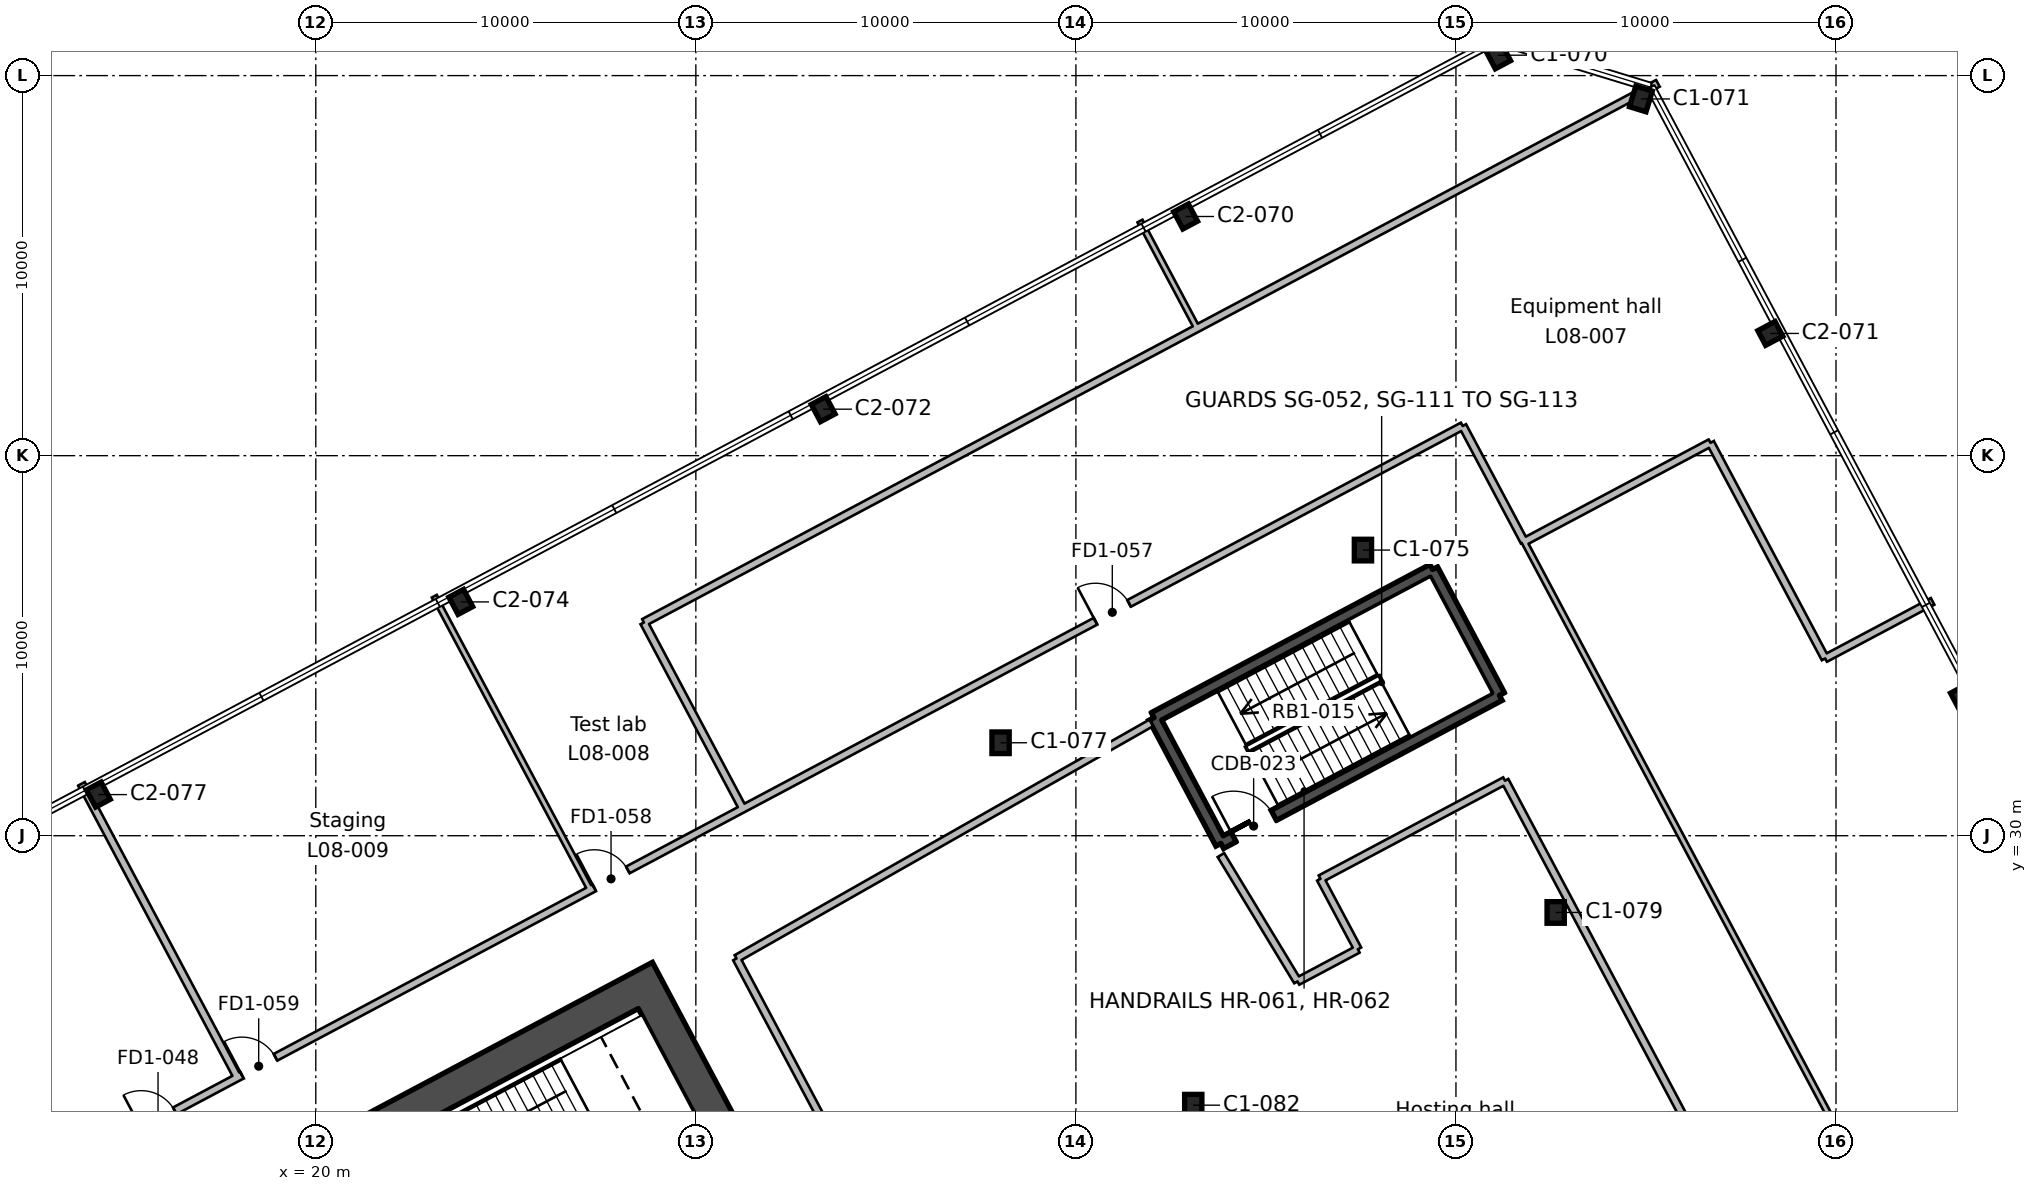
"""IFC4 building model, lengths in metres.
Left out: names, types, materials, properties, quantities, classifications, styles, units other than length and angle.
Written with IfcOpenShell. Run it as: python <this file> out.ifc"""

import sys

from ifc_helpers import new_model, si_unit, direction, frame, frame_2d, origin, origin_2d, place, context, subcontext, project, spatial, rectangle, i_section, extrude, element, fill, save


model = new_model("IFC4")
c1 = context("Model", 3, precision=1e-05, world=origin(), true_north=direction((0.0, 1.0)))
c2 = subcontext(c1, "Body", "Model", "MODEL_VIEW")
j1 = project(units=[si_unit("LENGTHUNIT", "METRE"), si_unit("PLANEANGLEUNIT", "RADIAN")], contexts=[c1])
p1 = place(None, origin())
s1 = spatial("IfcSite", under=j1, at=p1, CompositionType="ELEMENT")
p2 = place(p1, origin())
s2 = spatial("IfcBuilding", under=s1, at=p2, CompositionType="ELEMENT")
p3 = place(p2, frame((0.0, 0.0, 44.6)))
s3 = spatial("IfcBuildingStorey", under=s2, at=p3, CompositionType="ELEMENT", Elevation=44.6)
for number, where, z_axis, x_axis in (
    (1, (43.088, 22.91, 0.0), (0.0, 0.0, 1.0), (1.0, 0.0, 0.0)),
    (2, (52.624, 27.981, 0.0), (0.0, 0.0, 1.0), (1.0, 0.0, 0.0)),
):
    element("IfcColumn", number, at=place(p3, frame(where, z_axis=z_axis, x_axis=x_axis)), inside=s3, PredefinedType="COLUMN", context=c2, shape_type="SweptSolid", body=[
        extrude(i_section(OverallWidth=0.455, OverallDepth=0.569, WebThickness=0.078, FlangeThickness=0.125, FilletRadius=0.015, at=origin_2d()), origin(), (0.0, 0.0, 1.0), 5.4),
    ])
p4 = place(p3, frame((14.279, 31.082, 0.0), z_axis=(0.0, 0.0, 1.0), x_axis=(-0.882947592859, -0.469471562786, 0.0)))
e3 = element("IfcColumn", 3, at=p4, inside=s3, PredefinedType="COLUMN", context=c2, shape_type="SweptSolid", body=[
    extrude(i_section(OverallWidth=0.437, OverallDepth=0.513, WebThickness=0.061, FlangeThickness=0.097, FilletRadius=0.015, at=origin_2d()), origin(), (0.0, 0.0, 1.0), 5.4),
])
p5 = place(p3, frame((38.018, 32.446, 0.0), z_axis=(0.0, 0.0, 1.0), x_axis=(1.0, 0.0, 0.0)))
e4 = element("IfcColumn", 4, at=p5, inside=s3, PredefinedType="COLUMN", context=c2, shape_type="SweptSolid", body=[
    extrude(i_section(OverallWidth=0.455, OverallDepth=0.569, WebThickness=0.078, FlangeThickness=0.125, FilletRadius=0.015, at=origin_2d()), origin(), (0.0, 0.0, 1.0), 5.4),
])
for number, where, z_axis, x_axis in (
    (5, (63.343, 33.68, 0.0), (0.0, 0.0, 1.0), (-0.469, 0.883, 0.0)),
    (6, (23.815, 36.152, 0.0), (0.0, 0.0, 1.0), (-0.883, -0.469, 0.0)),
):
    element("IfcColumn", number, at=place(p3, frame(where, z_axis=z_axis, x_axis=x_axis)), inside=s3, PredefinedType="COLUMN", context=c2, shape_type="SweptSolid", body=[
        extrude(i_section(OverallWidth=0.437, OverallDepth=0.513, WebThickness=0.061, FlangeThickness=0.097, FilletRadius=0.015, at=origin_2d()), origin(), (0.0, 0.0, 1.0), 5.4),
    ])
p6 = place(p3, frame((47.553, 37.516, 0.0), z_axis=(0.0, 0.0, 1.0), x_axis=(1.0, 0.0, 0.0)))
e7 = element("IfcColumn", 7, at=p6, inside=s3, PredefinedType="COLUMN", context=c2, shape_type="SweptSolid", body=[
    extrude(i_section(OverallWidth=0.455, OverallDepth=0.569, WebThickness=0.078, FlangeThickness=0.125, FilletRadius=0.015, at=origin_2d()), origin(), (0.0, 0.0, 1.0), 5.4),
])
for number, where, z_axis, x_axis in (
    (8, (33.351, 41.223, 0.0), (0.0, 0.0, 1.0), (-0.883, -0.469, 0.0)),
    (9, (58.272, 43.216, 0.0), (0.0, 0.0, 1.0), (-0.469, 0.883, 0.0)),
    (10, (42.887, 46.293, 0.0), (0.0, 0.0, 1.0), (-0.883, -0.469, 0.0)),
):
    element("IfcColumn", number, at=place(p3, frame(where, z_axis=z_axis, x_axis=x_axis)), inside=s3, PredefinedType="COLUMN", context=c2, shape_type="SweptSolid", body=[
        extrude(i_section(OverallWidth=0.437, OverallDepth=0.513, WebThickness=0.061, FlangeThickness=0.097, FilletRadius=0.015, at=origin_2d()), origin(), (0.0, 0.0, 1.0), 5.4),
    ])
for number, where, z_axis, x_axis in (
    (11, (54.867, 49.386, 0.0), (0.0, 0.0, 1.0), (-0.956, 0.292, 0.0)),
    (12, (51.103, 50.537, 0.0), (0.0, 0.0, 1.0), (-0.883, -0.469, 0.0)),
):
    element("IfcColumn", number, at=place(p3, frame(where, z_axis=z_axis, x_axis=x_axis)), inside=s3, PredefinedType="COLUMN", context=c2, shape_type="SweptSolid", body=[
        extrude(i_section(OverallWidth=0.455, OverallDepth=0.569, WebThickness=0.078, FlangeThickness=0.125, FilletRadius=0.015, at=origin_2d()), origin(), (0.0, 0.0, 1.0), 5.4),
    ])
p7 = place(p3, frame((37.849, 8.799, 0.0), z_axis=(0.0, 0.0, 1.0), x_axis=(-0.469465789982, 0.882950662289, 0.0)))
e13 = element("IfcWall", 13, at=p7, inside=s3, PredefinedType="SHEAR", context=c2, shape_type="SweptSolid", body=[
    extrude(rectangle(XDim=20.0, YDim=0.9, at=frame_2d((10.0, 0.0))), origin(), (0.0, 0.0, 1.0), 5.4),
])
p8 = place(p7, frame((10.6, 0.0, 0.0)))
e14 = element("IfcOpeningElement", 14, at=p8, cuts=e13, PredefinedType="OPENING", context=c2, shape_type="SweptSolid", body=[
    extrude(rectangle(XDim=2.4, YDim=2.4, at=frame_2d((1.2, 1.2))), frame((0.0, 0.46, 0.0), z_axis=(0.0, -1.0, 0.0), x_axis=(1.0, 0.0, 0.0)), (0.0, 0.0, 1.0), 0.92),
])
p9 = place(p3, frame((10.438, 16.366, 0.0), z_axis=(0.0, 0.0, 1.0), x_axis=(0.88294509198, 0.469476266226, 0.0)))
e15 = element("IfcWall", 15, at=p9, inside=s3, PredefinedType="SHEAR", context=c2, shape_type="SweptSolid", body=[
    extrude(rectangle(XDim=20.2, YDim=0.9, at=frame_2d((10.1, 0.0))), origin(), (0.0, 0.0, 1.0), 5.4),
])
p10 = place(p3, frame((49.384, 37.004, 0.0), z_axis=(0.0, 0.0, 1.0), x_axis=(0.46946936446, -0.882948761726, 0.0)))
e16 = element("IfcWall", 16, at=p10, inside=s3, PredefinedType="SHEAR", context=c2, shape_type="SweptSolid", body=[
    extrude(rectangle(XDim=3.75, YDim=0.3, at=frame_2d((1.875, 0.0))), origin(), (0.0, 0.0, 1.0), 5.4),
])
p11 = place(p3, frame((51.145, 33.693, 0.0), z_axis=(0.0, 0.0, 1.0), x_axis=(-0.882945809314, -0.469474917132, 0.0)))
e17 = element("IfcWall", 17, at=p11, inside=s3, PredefinedType="SHEAR", context=c2, shape_type="SweptSolid", body=[
    extrude(rectangle(XDim=8.3, YDim=0.3, at=frame_2d((4.15, 0.0))), origin(), (0.0, 0.0, 1.0), 5.4),
])
p12 = place(p11, frame((6.725, 0.0, 0.0)))
e18 = element("IfcOpeningElement", 18, at=p12, cuts=e17, PredefinedType="OPENING", context=c2, shape_type="SweptSolid", body=[
    extrude(rectangle(XDim=1.2, YDim=2.1, at=frame_2d((0.6, 1.05))), frame((0.0, 0.16, 0.0), z_axis=(0.0, -1.0, 0.0), x_axis=(1.0, 0.0, 0.0)), (0.0, 0.0, 1.0), 0.32),
])
p13 = place(p3, frame((43.816, 29.796, 0.0), z_axis=(0.0, 0.0, 1.0), x_axis=(-0.46946936446, 0.882948761726, 0.0)))
e19 = element("IfcWall", 19, at=p13, inside=s3, PredefinedType="SHEAR", context=c2, shape_type="SweptSolid", body=[
    extrude(rectangle(XDim=3.75, YDim=0.3, at=frame_2d((1.875, 0.0))), origin(), (0.0, 0.0, 1.0), 5.4),
])
p14 = place(p3, frame((42.055, 33.107, 0.0), z_axis=(0.0, 0.0, 1.0), x_axis=(0.882945809314, 0.469474917132, 0.0)))
e20 = element("IfcWall", 20, at=p14, inside=s3, PredefinedType="SHEAR", context=c2, shape_type="SweptSolid", body=[
    extrude(rectangle(XDim=8.3, YDim=0.3, at=frame_2d((4.15, 0.0))), origin(), (0.0, 0.0, 1.0), 5.4),
])
p15 = place(p3, frame((0.0, 14.1, 0.0), z_axis=(0.0, 0.0, 1.0), x_axis=(0.882945550769, 0.469475403378, 0.0)))
e21 = element("IfcWall", 21, at=p15, inside=s3, PredefinedType="PARTITIONING", context=c2, shape_type="SweptSolid", body=[
    extrude(rectangle(XDim=35.938, YDim=0.2, at=frame_2d((17.969, 0.0))), origin(), (0.0, 0.0, 1.0), 4.95),
])
p16 = place(p15, frame((30.95, 0.0, 0.0)))
e22 = element("IfcOpeningElement", 22, at=p16, cuts=e21, PredefinedType="OPENING", context=c2, shape_type="SweptSolid", body=[
    extrude(rectangle(XDim=1.0, YDim=2.1, at=frame_2d((0.5, 1.05))), frame((0.0, 0.11, 0.0), z_axis=(0.0, -1.0, 0.0), x_axis=(1.0, 0.0, 0.0)), (0.0, 0.0, 1.0), 0.22),
])
p17 = place(p15, frame((20.45, 0.0, 0.0)))
e23 = element("IfcOpeningElement", 23, at=p17, cuts=e21, PredefinedType="OPENING", context=c2, shape_type="SweptSolid", body=[
    extrude(rectangle(XDim=1.0, YDim=2.1, at=frame_2d((0.5, 1.05))), frame((0.0, 0.11, 0.0), z_axis=(0.0, -1.0, 0.0), x_axis=(1.0, 0.0, 0.0)), (0.0, 0.0, 1.0), 0.22),
])
p18 = place(p15, frame((17.45, 0.0, 0.0)))
e24 = element("IfcOpeningElement", 24, at=p18, cuts=e21, PredefinedType="OPENING", context=c2, shape_type="SweptSolid", body=[
    extrude(rectangle(XDim=1.0, YDim=2.1, at=frame_2d((0.5, 1.05))), frame((0.0, 0.11, 0.0), z_axis=(0.0, -1.0, 0.0), x_axis=(1.0, 0.0, 0.0)), (0.0, 0.0, 1.0), 0.22),
])
p19 = place(p3, frame((13.834, 31.366, 0.0), z_axis=(0.0, 0.0, 1.0), x_axis=(0.469374180568, -0.882999365014, 0.0)))
e25 = element("IfcWall", 25, at=p19, inside=s3, PredefinedType="PARTITIONING", context=c2, shape_type="SweptSolid", body=[
    extrude(rectangle(XDim=8.75, YDim=0.2, at=frame_2d((4.375, 0.0))), origin(), (0.0, 0.0, 1.0), 4.95),
])
p20 = place(p3, frame((23.117, 36.302, 0.0), z_axis=(0.0, 0.0, 1.0), x_axis=(0.469482945701, -0.882941540361, 0.0)))
e26 = element("IfcWall", 26, at=p20, inside=s3, PredefinedType="PARTITIONING", context=c2, shape_type="SweptSolid", body=[
    extrude(rectangle(XDim=8.75, YDim=0.15, at=frame_2d((4.375, 0.0))), origin(), (0.0, 0.0, 1.0), 4.95),
])
p21 = place(p3, frame((31.23, 30.726, 0.0), z_axis=(0.0, 0.0, 1.0), x_axis=(-0.469403649121, 0.882983699845, 0.0)))
e27 = element("IfcWall", 27, at=p21, inside=s3, PredefinedType="PARTITIONING", context=c2, shape_type="SweptSolid", body=[
    extrude(rectangle(XDim=5.532, YDim=0.2, at=frame_2d((2.766, 0.0))), origin(), (0.0, 0.0, 1.0), 4.95),
])
p22 = place(p3, frame((28.633, 35.611, 0.0), z_axis=(0.0, 0.0, 1.0), x_axis=(0.882944068981, 0.469478190176, 0.0)))
e28 = element("IfcWall", 28, at=p22, inside=s3, PredefinedType="PARTITIONING", context=c2, shape_type="SweptSolid", body=[
    extrude(rectangle(XDim=15.622, YDim=0.2, at=frame_2d((7.811, 0.0))), origin(), (0.0, 0.0, 1.0), 4.95),
])
p23 = place(p3, frame((31.731, 30.972, 0.0), z_axis=(0.0, 0.0, 1.0), x_axis=(0.88293515824, 0.469494948156, 0.0)))
e29 = element("IfcWall", 29, at=p23, inside=s3, PredefinedType="PARTITIONING", context=c2, shape_type="SweptSolid", body=[
    extrude(rectangle(XDim=20.893, YDim=0.2, at=frame_2d((10.446, 0.0))), origin(), (0.0, 0.0, 1.0), 4.95),
])
p24 = place(p23, frame((9.95, 0.0, 0.0)))
e30 = element("IfcOpeningElement", 30, at=p24, cuts=e29, PredefinedType="OPENING", context=c2, shape_type="SweptSolid", body=[
    extrude(rectangle(XDim=1.0, YDim=2.1, at=frame_2d((0.5, 1.05))), frame((0.0, 0.11, 0.0), z_axis=(0.0, -1.0, 0.0), x_axis=(1.0, 0.0, 0.0)), (0.0, 0.0, 1.0), 0.22),
])
p25 = place(p3, frame((50.178, 40.781, 0.0), z_axis=(0.0, 0.0, 1.0), x_axis=(0.469355564401, -0.883009260521, 0.0)))
e31 = element("IfcWall", 31, at=p25, inside=s3, PredefinedType="PARTITIONING", context=c2, shape_type="SweptSolid", body=[
    extrude(rectangle(XDim=3.445, YDim=0.2, at=frame_2d((1.723, 0.0))), origin(), (0.0, 0.0, 1.0), 4.95),
])
p26 = place(p3, frame((39.567, 10.788, 0.0), z_axis=(0.0, 0.0, 1.0), x_axis=(-0.469474056812, 0.882946266757, 0.0)))
e32 = element("IfcWall", 32, at=p26, inside=s3, PredefinedType="PARTITIONING", context=c2, shape_type="SweptSolid", body=[
    extrude(rectangle(XDim=18.101, YDim=0.2, at=frame_2d((9.05, 0.0))), origin(), (0.0, 0.0, 1.0), 4.95),
])
p27 = place(p26, frame((8.55, 0.0, 0.0)))
e33 = element("IfcOpeningElement", 33, at=p27, cuts=e32, PredefinedType="OPENING", context=c2, shape_type="SweptSolid", body=[
    extrude(rectangle(XDim=1.0, YDim=2.1, at=frame_2d((0.5, 1.05))), frame((0.0, 0.11, 0.0), z_axis=(0.0, -1.0, 0.0), x_axis=(1.0, 0.0, 0.0)), (0.0, 0.0, 1.0), 0.22),
])
p28 = place(p3, frame((31.069, 26.77, 0.0), z_axis=(0.0, 0.0, 1.0), x_axis=(0.86954617394, 0.493851649168, 0.0)))
e34 = element("IfcWall", 34, at=p28, inside=s3, PredefinedType="PARTITIONING", context=c2, shape_type="SweptSolid", body=[
    extrude(rectangle(XDim=12.55, YDim=0.2, at=frame_2d((6.275, 0.0))), origin(), (0.0, 0.0, 1.0), 4.95),
])
p29 = place(p3, frame((41.686, 46.175, 0.0), z_axis=(0.0, 0.0, 1.0), x_axis=(0.469447181805, -0.882960556025, 0.0)))
e35 = element("IfcWall", 35, at=p29, inside=s3, PredefinedType="PARTITIONING", context=c2, shape_type="SweptSolid", body=[
    extrude(rectangle(XDim=3.199, YDim=0.15, at=frame_2d((1.6, 0.0))), origin(), (0.0, 0.0, 1.0), 4.95),
])
p30 = place(p3, frame((42.426, 42.945, 0.0), z_axis=(0.0, 0.0, 1.0), x_axis=(0.882949550604, 0.469467880785, 0.0)))
e36 = element("IfcWall", 36, at=p30, inside=s3, PredefinedType="PARTITIONING", context=c2, shape_type="SweptSolid", body=[
    extrude(rectangle(XDim=14.595, YDim=0.2, at=frame_2d((7.298, 0.0))), origin(), (0.0, 0.0, 1.0), 4.95),
])
p31 = place(p3, frame((43.816, 29.491, 0.0), z_axis=(0.0, 0.0, 1.0), x_axis=(0.518473208291, -0.855093873376, 0.0)))
e37 = element("IfcWall", 37, at=p31, inside=s3, PredefinedType="PARTITIONING", context=c2, shape_type="SweptSolid", body=[
    extrude(rectangle(XDim=1.325, YDim=0.2, at=frame_2d((0.663, 0.0))), origin(), (0.0, 0.0, 1.0), 4.95),
])
p32 = place(p3, frame((45.831, 26.167, 0.0), z_axis=(0.0, 0.0, 1.0), x_axis=(-0.518386189645, 0.855146629757, 0.0)))
e38 = element("IfcWall", 38, at=p32, inside=s3, PredefinedType="PARTITIONING", context=c2, shape_type="SweptSolid", body=[
    extrude(rectangle(XDim=2.562, YDim=0.2, at=frame_2d((1.281, 0.0))), origin(), (0.0, 0.0, 1.0), 4.95),
])
p33 = place(p3, frame((47.42, 27.012, 0.0), z_axis=(0.0, 0.0, 1.0), x_axis=(-0.882911879422, -0.469538723829, 0.0)))
e39 = element("IfcWall", 39, at=p33, inside=s3, PredefinedType="PARTITIONING", context=c2, shape_type="SweptSolid", body=[
    extrude(rectangle(XDim=1.8, YDim=0.2, at=frame_2d((0.9, 0.0))), origin(), (0.0, 0.0, 1.0), 4.95),
])
p34 = place(p3, frame((46.434, 28.866, 0.0), z_axis=(0.0, 0.0, 1.0), x_axis=(0.882942083458, 0.469481924316, 0.0)))
e40 = element("IfcWall", 40, at=p34, inside=s3, PredefinedType="PARTITIONING", context=c2, shape_type="SweptSolid", body=[
    extrude(rectangle(XDim=5.5, YDim=0.2, at=frame_2d((2.75, 0.0))), origin(), (0.0, 0.0, 1.0), 4.95),
])
p35 = place(p3, frame((51.29, 31.448, 0.0), z_axis=(0.0, 0.0, 1.0), x_axis=(0.469459757109, -0.882953869947, 0.0)))
e41 = element("IfcWall", 41, at=p35, inside=s3, PredefinedType="PARTITIONING", context=c2, shape_type="SweptSolid", body=[
    extrude(rectangle(XDim=12.738, YDim=0.2, at=frame_2d((6.369, 0.0))), origin(), (0.0, 0.0, 1.0), 4.95),
])
p36 = place(p3, frame((47.42, 27.012, 0.0), z_axis=(0.0, 0.0, 1.0), x_axis=(-0.469489562011, 0.882938022266, 0.0)))
e42 = element("IfcWall", 42, at=p36, inside=s3, PredefinedType="PARTITIONING", context=c2, shape_type="SweptSolid", body=[
    extrude(rectangle(XDim=2.1, YDim=0.2, at=frame_2d((1.05, 0.0))), origin(), (0.0, 0.0, 1.0), 4.95),
])
p37 = place(p3, frame((51.795, 37.739, 0.0), z_axis=(0.0, 0.0, 1.0), x_axis=(0.469480492676, -0.882942844694, 0.0)))
e43 = element("IfcWall", 43, at=p37, inside=s3, PredefinedType="PARTITIONING", context=c2, shape_type="SweptSolid", body=[
    extrude(rectangle(XDim=21.456, YDim=0.15, at=frame_2d((10.728, 0.0))), origin(), (0.0, 0.0, 1.0), 4.95),
])
p38 = place(p3, frame((62.542, 36.166, 0.0), z_axis=(0.0, 0.0, 1.0), x_axis=(-0.883094981885, -0.46919425931, 0.0)))
e44 = element("IfcWall", 44, at=p38, inside=s3, PredefinedType="PARTITIONING", context=c2, shape_type="SweptSolid", body=[
    extrude(rectangle(XDim=3.201, YDim=0.2, at=frame_2d((1.601, 0.0))), origin(), (0.0, 0.0, 1.0), 4.95),
])
p39 = place(p3, frame((59.715, 34.664, 0.0), z_axis=(0.0, 0.0, 1.0), x_axis=(-0.4695430505, 0.882909578455, 0.0)))
e45 = element("IfcWall", 45, at=p39, inside=s3, PredefinedType="PARTITIONING", context=c2, shape_type="SweptSolid", body=[
    extrude(rectangle(XDim=6.428, YDim=0.2, at=frame_2d((3.214, 0.0))), origin(), (0.0, 0.0, 1.0), 4.95),
])
p40 = place(p3, frame((56.697, 40.339, 0.0), z_axis=(0.0, 0.0, 1.0), x_axis=(-0.883007442596, -0.469358984488, 0.0)))
e46 = element("IfcWall", 46, at=p40, inside=s3, PredefinedType="PARTITIONING", context=c2, shape_type="SweptSolid", body=[
    extrude(rectangle(XDim=5.548, YDim=0.2, at=frame_2d((2.774, 0.0))), origin(), (0.0, 0.0, 1.0), 4.95),
])
p41 = place(p12, frame((1.2, 0.0, 0.0), z_axis=(0.0, 0.0, 1.0), x_axis=(-1.0, 0.0, 0.0)))
e47 = element("IfcDoor", 47, at=p41, inside=s3, OperationType="SINGLE_SWING_LEFT", PredefinedType="DOOR", context=c2, shape_type="SweptSolid", body=[
    extrude(rectangle(XDim=1.2, YDim=2.1, at=frame_2d((0.6, 1.05))), frame((0.0, 0.025, 0.0), z_axis=(0.0, -1.0, 0.0), x_axis=(1.0, 0.0, 0.0)), (0.0, 0.0, 1.0), 0.05),
])
fill(e18, e47)
p42 = place(p24, origin())
e48 = element("IfcDoor", 48, at=p42, inside=s3, OperationType="SINGLE_SWING_LEFT", PredefinedType="DOOR", context=c2, shape_type="SweptSolid", body=[
    extrude(rectangle(XDim=1.0, YDim=2.1, at=frame_2d((0.5, 1.05))), frame((0.0, 0.025, 0.0), z_axis=(0.0, -1.0, 0.0), x_axis=(1.0, 0.0, 0.0)), (0.0, 0.0, 1.0), 0.05),
])
fill(e30, e48)
p43 = place(p16, origin())
e49 = element("IfcDoor", 49, at=p43, inside=s3, OperationType="SINGLE_SWING_LEFT", PredefinedType="DOOR", context=c2, shape_type="SweptSolid", body=[
    extrude(rectangle(XDim=1.0, YDim=2.1, at=frame_2d((0.5, 1.05))), frame((0.0, 0.025, 0.0), z_axis=(0.0, -1.0, 0.0), x_axis=(1.0, 0.0, 0.0)), (0.0, 0.0, 1.0), 0.05),
])
fill(e22, e49)
p44 = place(p17, origin())
e50 = element("IfcDoor", 50, at=p44, inside=s3, OperationType="SINGLE_SWING_LEFT", PredefinedType="DOOR", context=c2, shape_type="SweptSolid", body=[
    extrude(rectangle(XDim=1.0, YDim=2.1, at=frame_2d((0.5, 1.05))), frame((0.0, 0.025, 0.0), z_axis=(0.0, -1.0, 0.0), x_axis=(1.0, 0.0, 0.0)), (0.0, 0.0, 1.0), 0.05),
])
fill(e23, e50)
p45 = place(p18, origin())
e51 = element("IfcDoor", 51, at=p45, inside=s3, OperationType="SINGLE_SWING_LEFT", PredefinedType="DOOR", context=c2, shape_type="SweptSolid", body=[
    extrude(rectangle(XDim=1.0, YDim=2.1, at=frame_2d((0.5, 1.05))), frame((0.0, 0.025, 0.0), z_axis=(0.0, -1.0, 0.0), x_axis=(1.0, 0.0, 0.0)), (0.0, 0.0, 1.0), 0.05),
])
fill(e24, e51)
save(model, sys.argv[1])
